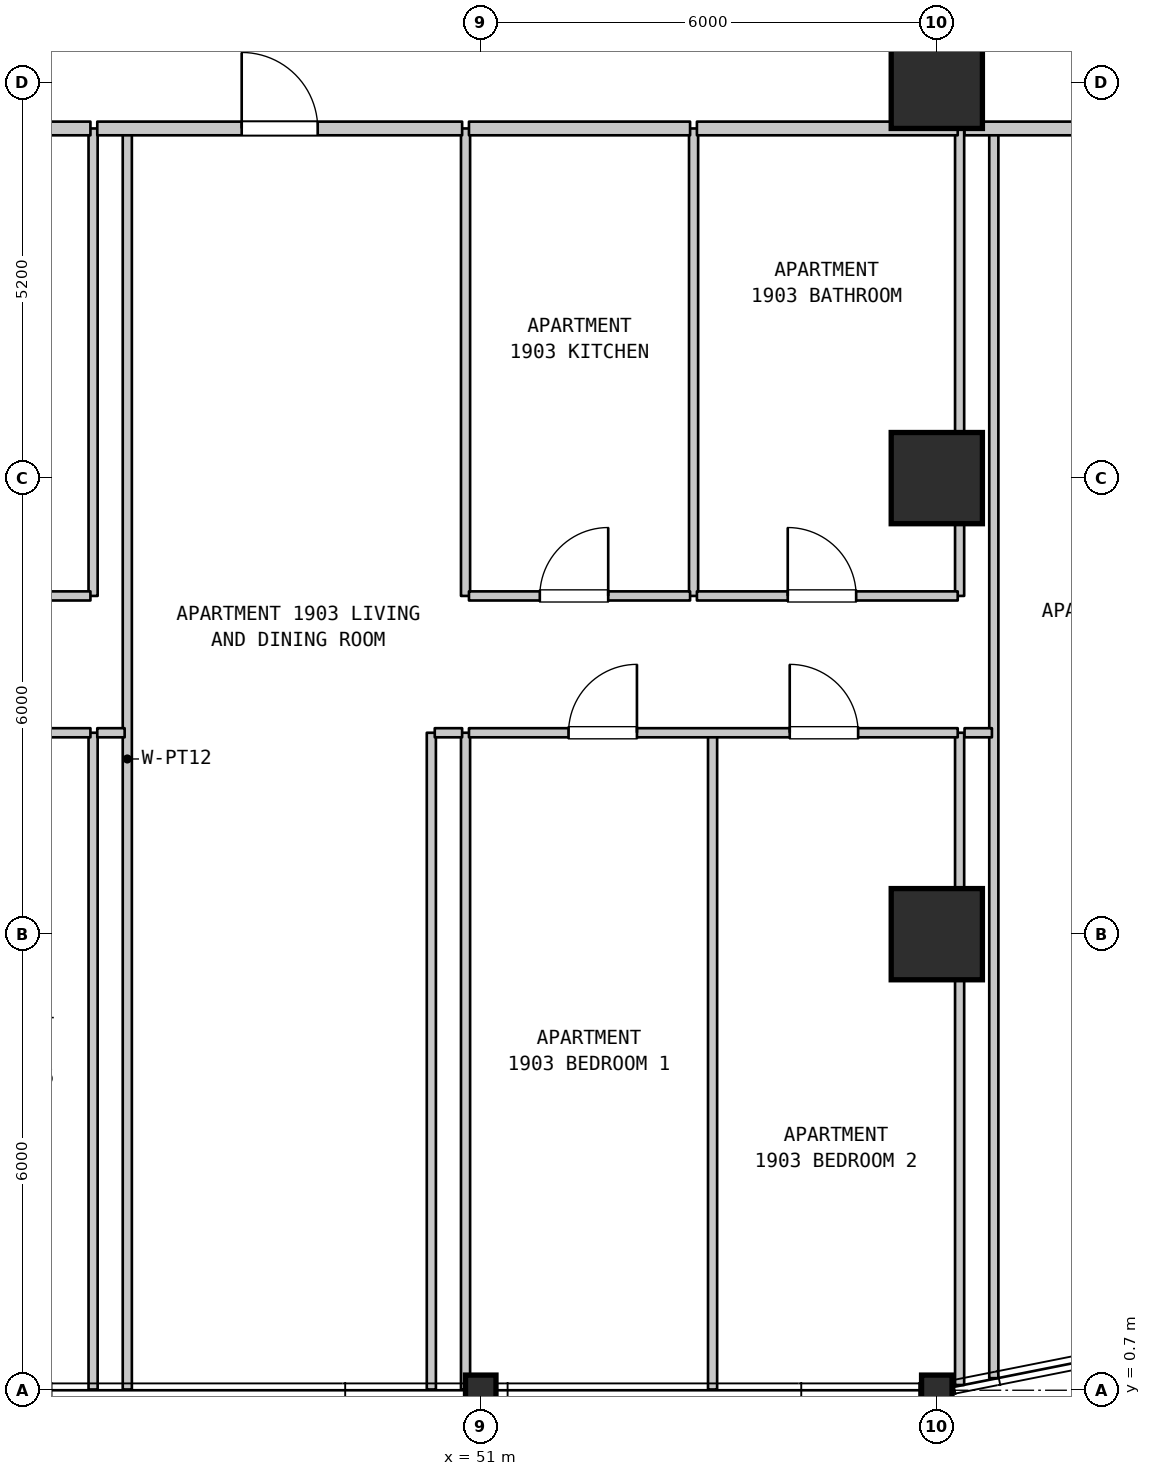
"""IFC4 building model, lengths in metres.
Left out: names, types, materials, properties, quantities, classifications, styles, units other than length and angle.
Written with IfcOpenShell. Run it as: python <this file> out.ifc"""

import sys

from ifc_helpers import new_model, si_unit, direction, frame, frame_2d, origin, origin_2d, place, context, subcontext, project, spatial, rectangle, i_section, extrude, element, fill, save


model = new_model("IFC4")
c1 = context("Model", 3, precision=1e-05, world=origin(), true_north=direction((0.0, 1.0)))
c2 = subcontext(c1, "Body", "Model", "MODEL_VIEW")
j1 = project(units=[si_unit("LENGTHUNIT", "METRE"), si_unit("PLANEANGLEUNIT", "RADIAN")], contexts=[c1])
p1 = place(None, origin())
s1 = spatial("IfcSite", under=j1, at=p1, CompositionType="ELEMENT")
p2 = place(p1, origin())
s2 = spatial("IfcBuilding", under=s1, at=p2, CompositionType="ELEMENT")
p3 = place(p2, frame((0.0, 0.0, 81.2)))
s3 = spatial("IfcBuildingStorey", under=s2, at=p3, CompositionType="ELEMENT", Elevation=81.2)
for number, where, z_axis, x_axis in (
    (1, (51.0, 0.7, 0.0), (0.0, 0.0, 1.0), (1.0, 0.0, 0.0)),
    (2, (57.0, 0.7, 0.0), (0.0, 0.0, 1.0), (1.0, 0.0, 0.0)),
):
    element("IfcColumn", number, at=place(p3, frame(where, z_axis=z_axis, x_axis=x_axis)), inside=s3, PredefinedType="COLUMN", context=c2, shape_type="SweptSolid", body=[
        extrude(i_section(OverallWidth=0.401, OverallDepth=0.399, WebThickness=0.025, FlangeThickness=0.04, FilletRadius=0.015, at=origin_2d()), origin(), (0.0, 0.0, 1.0), 5.2),
    ])
for number, where, z_axis, x_axis in (
    (3, (57.0, 6.7, 0.0), (0.0, 0.0, 1.0), (1.0, 0.0, 0.0)),
    (4, (57.0, 12.7, 0.0), (0.0, 0.0, 1.0), (1.0, 0.0, 0.0)),
    (5, (57.0, 17.9, 0.0), (0.0, 0.0, 1.0), (1.0, 0.0, 0.0)),
):
    element("IfcColumn", number, at=place(p3, frame(where, z_axis=z_axis, x_axis=x_axis)), inside=s3, PredefinedType="COLUMN", context=c2, shape_type="SweptSolid", body=[
        extrude(rectangle(XDim=1.2, YDim=1.2, at=origin_2d()), origin(), (0.0, 0.0, 1.0), 5.2),
    ])
p4 = place(p3, frame((45.9, 0.71, 0.0), z_axis=(0.0, 0.0, 1.0), x_axis=(0.0, 1.0, 0.0)))
e6 = element("IfcWall", 6, at=p4, inside=s3, PredefinedType="PARTITIONING", context=c2, shape_type="SweptSolid", body=[
    extrude(rectangle(XDim=8.64, YDim=0.12, at=frame_2d((4.32, 0.0))), origin(), (0.0, 0.0, 1.0), 4.885),
])
p5 = place(p3, frame((45.9, 11.15, 0.0), z_axis=(0.0, 0.0, 1.0), x_axis=(0.0, 1.0, 0.0)))
e7 = element("IfcWall", 7, at=p5, inside=s3, PredefinedType="PARTITIONING", context=c2, shape_type="SweptSolid", body=[
    extrude(rectangle(XDim=6.15, YDim=0.12, at=frame_2d((3.075, 0.0))), origin(), (0.0, 0.0, 1.0), 4.885),
])
p6 = place(p3, frame((46.35, 0.71, 0.0), z_axis=(0.0, 0.0, 1.0), x_axis=(0.0, 1.0, 0.0)))
e8 = element("IfcWall", 8, at=p6, inside=s3, PredefinedType="PARTITIONING", context=c2, shape_type="SweptSolid", body=[
    extrude(rectangle(XDim=16.59, YDim=0.12, at=frame_2d((8.295, 0.0))), origin(), (0.0, 0.0, 1.0), 4.885),
])
for number, where, z_axis, x_axis in (
    (9, (50.35, 0.71, 0.0), (0.0, 0.0, 1.0), (0.0, 1.0, 0.0)),
    (10, (50.8, 0.71, 0.0), (0.0, 0.0, 1.0), (0.0, 1.0, 0.0)),
):
    element("IfcWall", number, at=place(p3, frame(where, z_axis=z_axis, x_axis=x_axis)), inside=s3, PredefinedType="PARTITIONING", context=c2, shape_type="SweptSolid", body=[
        extrude(rectangle(XDim=8.64, YDim=0.12, at=frame_2d((4.32, 0.0))), origin(), (0.0, 0.0, 1.0), 4.885),
    ])
for number, where, z_axis, x_axis in (
    (11, (50.8, 11.15, 0.0), (0.0, 0.0, 1.0), (0.0, 1.0, 0.0)),
    (12, (53.8, 11.15, 0.0), (0.0, 0.0, 1.0), (0.0, 1.0, 0.0)),
):
    element("IfcWall", number, at=place(p3, frame(where, z_axis=z_axis, x_axis=x_axis)), inside=s3, PredefinedType="PARTITIONING", context=c2, shape_type="SweptSolid", body=[
        extrude(rectangle(XDim=6.15, YDim=0.12, at=frame_2d((3.075, 0.0))), origin(), (0.0, 0.0, 1.0), 4.885),
    ])
p7 = place(p3, frame((54.05, 0.71, 0.0), z_axis=(0.0, 0.0, 1.0), x_axis=(0.0, 1.0, 0.0)))
e13 = element("IfcWall", 13, at=p7, inside=s3, PredefinedType="PARTITIONING", context=c2, shape_type="SweptSolid", body=[
    extrude(rectangle(XDim=8.64, YDim=0.12, at=frame_2d((4.32, 0.0))), origin(), (0.0, 0.0, 1.0), 4.885),
])
p8 = place(p3, frame((57.3, 0.769, 0.0), z_axis=(0.0, 0.0, 1.0), x_axis=(0.0, 1.0, 0.0)))
e14 = element("IfcWall", 14, at=p8, inside=s3, PredefinedType="PARTITIONING", context=c2, shape_type="SweptSolid", body=[
    extrude(rectangle(XDim=8.581, YDim=0.12, at=frame_2d((4.291, 0.0))), origin(), (0.0, 0.0, 1.0), 4.885),
])
p9 = place(p3, frame((57.3, 11.15, 0.0), z_axis=(0.0, 0.0, 1.0), x_axis=(0.0, 1.0, 0.0)))
e15 = element("IfcWall", 15, at=p9, inside=s3, PredefinedType="PARTITIONING", context=c2, shape_type="SweptSolid", body=[
    extrude(rectangle(XDim=6.15, YDim=0.12, at=frame_2d((3.075, 0.0))), origin(), (0.0, 0.0, 1.0), 4.885),
])
p10 = place(p3, frame((57.75, 0.859, 0.0), z_axis=(0.0, 0.0, 1.0), x_axis=(0.0, 1.0, 0.0)))
e16 = element("IfcWall", 16, at=p10, inside=s3, PredefinedType="PARTITIONING", context=c2, shape_type="SweptSolid", body=[
    extrude(rectangle(XDim=16.441, YDim=0.12, at=frame_2d((8.221, 0.0))), origin(), (0.0, 0.0, 1.0), 4.885),
])
p11 = place(p3, frame((33.795, 9.35, 0.0), z_axis=(0.0, 0.0, 1.0), x_axis=(1.0, 0.0, 0.0)))
e17 = element("IfcWall", 17, at=p11, inside=s3, PredefinedType="PARTITIONING", context=c2, shape_type="SweptSolid", body=[
    extrude(rectangle(XDim=12.07, YDim=0.12, at=frame_2d((6.035, 0.0))), origin(), (0.0, 0.0, 1.0), 4.885),
])
p12 = place(p11, frame((0.826, 0.0, 0.0)))
e18 = element("IfcOpeningElement", 18, at=p12, cuts=e17, PredefinedType="OPENING", context=c2, shape_type="SweptSolid", body=[
    extrude(rectangle(XDim=0.9, YDim=2.15, at=frame_2d((0.45, 1.075))), frame((0.0, 0.07, 0.0), z_axis=(0.0, -1.0, 0.0), x_axis=(1.0, 0.0, 0.0)), (0.0, 0.0, 1.0), 0.14),
])
p13 = place(p11, frame((3.08, 0.0, 0.0)))
e19 = element("IfcOpeningElement", 19, at=p13, cuts=e17, PredefinedType="OPENING", context=c2, shape_type="SweptSolid", body=[
    extrude(rectangle(XDim=0.9, YDim=2.15, at=frame_2d((0.45, 1.075))), frame((0.0, 0.07, 0.0), z_axis=(0.0, -1.0, 0.0), x_axis=(1.0, 0.0, 0.0)), (0.0, 0.0, 1.0), 0.14),
])
p14 = place(p11, frame((5.512, 0.0, 0.0)))
e20 = element("IfcOpeningElement", 20, at=p14, cuts=e17, PredefinedType="OPENING", context=c2, shape_type="SweptSolid", body=[
    extrude(rectangle(XDim=0.9, YDim=2.15, at=frame_2d((0.45, 1.075))), frame((0.0, 0.07, 0.0), z_axis=(0.0, -1.0, 0.0), x_axis=(1.0, 0.0, 0.0)), (0.0, 0.0, 1.0), 0.14),
])
p15 = place(p11, frame((7.944, 0.0, 0.0)))
e21 = element("IfcOpeningElement", 21, at=p15, cuts=e17, PredefinedType="OPENING", context=c2, shape_type="SweptSolid", body=[
    extrude(rectangle(XDim=0.9, YDim=2.15, at=frame_2d((0.45, 1.075))), frame((0.0, 0.07, 0.0), z_axis=(0.0, -1.0, 0.0), x_axis=(1.0, 0.0, 0.0)), (0.0, 0.0, 1.0), 0.14),
])
p16 = place(p11, frame((10.204, 0.0, 0.0)))
e22 = element("IfcOpeningElement", 22, at=p16, cuts=e17, PredefinedType="OPENING", context=c2, shape_type="SweptSolid", body=[
    extrude(rectangle(XDim=0.9, YDim=2.15, at=frame_2d((0.45, 1.075))), frame((0.0, 0.07, 0.0), z_axis=(0.0, -1.0, 0.0), x_axis=(1.0, 0.0, 0.0)), (0.0, 0.0, 1.0), 0.14),
])
for number, where, z_axis, x_axis in (
    (23, (45.955, 9.35, 0.0), (0.0, 0.0, 1.0), (1.0, 0.0, 0.0)),
    (24, (50.395, 9.35, 0.0), (0.0, 0.0, 1.0), (1.0, 0.0, 0.0)),
):
    element("IfcWall", number, at=place(p3, frame(where, z_axis=z_axis, x_axis=x_axis)), inside=s3, PredefinedType="PARTITIONING", context=c2, shape_type="SweptSolid", body=[
        extrude(rectangle(XDim=0.36, YDim=0.12, at=frame_2d((0.18, 0.0))), origin(), (0.0, 0.0, 1.0), 4.885),
    ])
p17 = place(p3, frame((50.845, 9.35, 0.0), z_axis=(0.0, 0.0, 1.0), x_axis=(1.0, 0.0, 0.0)))
e25 = element("IfcWall", 25, at=p17, inside=s3, PredefinedType="PARTITIONING", context=c2, shape_type="SweptSolid", body=[
    extrude(rectangle(XDim=6.43, YDim=0.12, at=frame_2d((3.215, 0.0))), origin(), (0.0, 0.0, 1.0), 4.885),
])
p18 = place(p17, frame((1.31, 0.0, 0.0)))
e26 = element("IfcOpeningElement", 26, at=p18, cuts=e25, PredefinedType="OPENING", context=c2, shape_type="SweptSolid", body=[
    extrude(rectangle(XDim=0.9, YDim=2.15, at=frame_2d((0.45, 1.075))), frame((0.0, 0.07, 0.0), z_axis=(0.0, -1.0, 0.0), x_axis=(1.0, 0.0, 0.0)), (0.0, 0.0, 1.0), 0.14),
])
p19 = place(p17, frame((4.22, 0.0, 0.0)))
e27 = element("IfcOpeningElement", 27, at=p19, cuts=e25, PredefinedType="OPENING", context=c2, shape_type="SweptSolid", body=[
    extrude(rectangle(XDim=0.9, YDim=2.15, at=frame_2d((0.45, 1.075))), frame((0.0, 0.07, 0.0), z_axis=(0.0, -1.0, 0.0), x_axis=(1.0, 0.0, 0.0)), (0.0, 0.0, 1.0), 0.14),
])
p20 = place(p3, frame((57.365, 9.35, 0.0), z_axis=(0.0, 0.0, 1.0), x_axis=(1.0, 0.0, 0.0)))
e28 = element("IfcWall", 28, at=p20, inside=s3, PredefinedType="PARTITIONING", context=c2, shape_type="SweptSolid", body=[
    extrude(rectangle(XDim=0.36, YDim=0.12, at=frame_2d((0.18, 0.0))), origin(), (0.0, 0.0, 1.0), 4.885),
])
p21 = place(p3, frame((40.726, 11.15, 0.0), z_axis=(0.0, 0.0, 1.0), x_axis=(1.0, 0.0, 0.0)))
e29 = element("IfcWall", 29, at=p21, inside=s3, PredefinedType="PARTITIONING", context=c2, shape_type="SweptSolid", body=[
    extrude(rectangle(XDim=5.139, YDim=0.12, at=frame_2d((2.569, 0.0))), origin(), (0.0, 0.0, 1.0), 4.885),
])
p22 = place(p21, frame((2.049, 0.0, 0.0)))
e30 = element("IfcOpeningElement", 30, at=p22, cuts=e29, PredefinedType="OPENING", context=c2, shape_type="SweptSolid", body=[
    extrude(rectangle(XDim=0.9, YDim=2.15, at=frame_2d((0.45, 1.075))), frame((0.0, 0.07, 0.0), z_axis=(0.0, -1.0, 0.0), x_axis=(1.0, 0.0, 0.0)), (0.0, 0.0, 1.0), 0.14),
])
p23 = place(p3, frame((50.845, 11.15, 0.0), z_axis=(0.0, 0.0, 1.0), x_axis=(1.0, 0.0, 0.0)))
e31 = element("IfcWall", 31, at=p23, inside=s3, PredefinedType="PARTITIONING", context=c2, shape_type="SweptSolid", body=[
    extrude(rectangle(XDim=2.909, YDim=0.12, at=frame_2d((1.455, 0.0))), origin(), (0.0, 0.0, 1.0), 4.885),
])
p24 = place(p23, frame((0.932, 0.0, 0.0)))
e32 = element("IfcOpeningElement", 32, at=p24, cuts=e31, PredefinedType="OPENING", context=c2, shape_type="SweptSolid", body=[
    extrude(rectangle(XDim=0.9, YDim=2.15, at=frame_2d((0.45, 1.075))), frame((0.0, 0.07, 0.0), z_axis=(0.0, -1.0, 0.0), x_axis=(1.0, 0.0, 0.0)), (0.0, 0.0, 1.0), 0.14),
])
p25 = place(p3, frame((53.844, 11.15, 0.0), z_axis=(0.0, 0.0, 1.0), x_axis=(1.0, 0.0, 0.0)))
e33 = element("IfcWall", 33, at=p25, inside=s3, PredefinedType="PARTITIONING", context=c2, shape_type="SweptSolid", body=[
    extrude(rectangle(XDim=3.431, YDim=0.12, at=frame_2d((1.715, 0.0))), origin(), (0.0, 0.0, 1.0), 4.885),
])
p26 = place(p25, frame((1.195, 0.0, 0.0)))
e34 = element("IfcOpeningElement", 34, at=p26, cuts=e33, PredefinedType="OPENING", context=c2, shape_type="SweptSolid", body=[
    extrude(rectangle(XDim=0.9, YDim=2.1, at=frame_2d((0.45, 1.05))), frame((0.0, 0.07, 0.0), z_axis=(0.0, -1.0, 0.0), x_axis=(1.0, 0.0, 0.0)), (0.0, 0.0, 1.0), 0.14),
])
p27 = place(p3, frame((40.726, 17.3, 0.0), z_axis=(0.0, 0.0, 1.0), x_axis=(1.0, 0.0, 0.0)))
e35 = element("IfcWall", 35, at=p27, inside=s3, PredefinedType="STANDARD", context=c2, shape_type="SweptSolid", body=[
    extrude(rectangle(XDim=5.139, YDim=0.18, at=frame_2d((2.569, 0.0))), origin(), (0.0, 0.0, 1.0), 4.885),
])
p28 = place(p3, frame((45.955, 17.3, 0.0), z_axis=(0.0, 0.0, 1.0), x_axis=(1.0, 0.0, 0.0)))
e36 = element("IfcWall", 36, at=p28, inside=s3, PredefinedType="STANDARD", context=c2, shape_type="SweptSolid", body=[
    extrude(rectangle(XDim=4.8, YDim=0.18, at=frame_2d((2.4, 0.0))), origin(), (0.0, 0.0, 1.0), 4.885),
])
p29 = place(p28, frame((1.9, 0.0, 0.0)))
e37 = element("IfcOpeningElement", 37, at=p29, cuts=e36, PredefinedType="OPENING", context=c2, shape_type="SweptSolid", body=[
    extrude(rectangle(XDim=1.0, YDim=2.15, at=frame_2d((0.5, 1.075))), frame((0.0, 0.1, 0.0), z_axis=(0.0, -1.0, 0.0), x_axis=(1.0, 0.0, 0.0)), (0.0, 0.0, 1.0), 0.2),
])
p30 = place(p3, frame((50.845, 17.3, 0.0), z_axis=(0.0, 0.0, 1.0), x_axis=(1.0, 0.0, 0.0)))
e38 = element("IfcWall", 38, at=p30, inside=s3, PredefinedType="STANDARD", context=c2, shape_type="SweptSolid", body=[
    extrude(rectangle(XDim=2.909, YDim=0.18, at=frame_2d((1.455, 0.0))), origin(), (0.0, 0.0, 1.0), 4.885),
])
p31 = place(p3, frame((53.844, 17.3, 0.0), z_axis=(0.0, 0.0, 1.0), x_axis=(1.0, 0.0, 0.0)))
e39 = element("IfcWall", 39, at=p31, inside=s3, PredefinedType="STANDARD", context=c2, shape_type="SweptSolid", body=[
    extrude(rectangle(XDim=3.431, YDim=0.18, at=frame_2d((1.715, 0.0))), origin(), (0.0, 0.0, 1.0), 4.885),
])
p32 = place(p3, frame((57.365, 17.3, 0.0), z_axis=(0.0, 0.0, 1.0), x_axis=(1.0, 0.0, 0.0)))
e40 = element("IfcWall", 40, at=p32, inside=s3, PredefinedType="STANDARD", context=c2, shape_type="SweptSolid", body=[
    extrude(rectangle(XDim=4.77, YDim=0.18, at=frame_2d((2.385, 0.0))), origin(), (0.0, 0.0, 1.0), 4.885),
])
p33 = place(p32, frame((2.015, 0.0, 0.0)))
e41 = element("IfcOpeningElement", 41, at=p33, cuts=e40, PredefinedType="OPENING", context=c2, shape_type="SweptSolid", body=[
    extrude(rectangle(XDim=1.0, YDim=2.15, at=frame_2d((0.5, 1.075))), frame((0.0, 0.1, 0.0), z_axis=(0.0, -1.0, 0.0), x_axis=(1.0, 0.0, 0.0)), (0.0, 0.0, 1.0), 0.2),
])
p34 = place(p18, origin())
e42 = element("IfcDoor", 42, at=p34, inside=s3, OperationType="SINGLE_SWING_RIGHT", PredefinedType="DOOR", context=c2, shape_type="SweptSolid", body=[
    extrude(rectangle(XDim=0.9, YDim=2.15, at=frame_2d((0.45, 1.075))), frame((0.0, 0.025, 0.0), z_axis=(0.0, -1.0, 0.0), x_axis=(1.0, 0.0, 0.0)), (0.0, 0.0, 1.0), 0.05),
])
fill(e26, e42)
p35 = place(p19, origin())
e43 = element("IfcDoor", 43, at=p35, inside=s3, OperationType="SINGLE_SWING_LEFT", PredefinedType="DOOR", context=c2, shape_type="SweptSolid", body=[
    extrude(rectangle(XDim=0.9, YDim=2.15, at=frame_2d((0.45, 1.075))), frame((0.0, 0.025, 0.0), z_axis=(0.0, -1.0, 0.0), x_axis=(1.0, 0.0, 0.0)), (0.0, 0.0, 1.0), 0.05),
])
fill(e27, e43)
p36 = place(p24, origin())
e44 = element("IfcDoor", 44, at=p36, inside=s3, OperationType="SINGLE_SWING_RIGHT", PredefinedType="DOOR", context=c2, shape_type="SweptSolid", body=[
    extrude(rectangle(XDim=0.9, YDim=2.15, at=frame_2d((0.45, 1.075))), frame((0.0, 0.025, 0.0), z_axis=(0.0, -1.0, 0.0), x_axis=(1.0, 0.0, 0.0)), (0.0, 0.0, 1.0), 0.05),
])
fill(e32, e44)
p37 = place(p26, origin())
e45 = element("IfcDoor", 45, at=p37, inside=s3, OperationType="SINGLE_SWING_LEFT", PredefinedType="DOOR", context=c2, shape_type="SweptSolid", body=[
    extrude(rectangle(XDim=0.9, YDim=2.1, at=frame_2d((0.45, 1.05))), frame((0.0, 0.025, 0.0), z_axis=(0.0, -1.0, 0.0), x_axis=(1.0, 0.0, 0.0)), (0.0, 0.0, 1.0), 0.05),
])
fill(e34, e45)
p38 = place(p29, origin())
e46 = element("IfcDoor", 46, at=p38, inside=s3, OperationType="SINGLE_SWING_LEFT", PredefinedType="DOOR", context=c2, shape_type="SweptSolid", body=[
    extrude(rectangle(XDim=1.0, YDim=2.15, at=frame_2d((0.5, 1.075))), frame((0.0, 0.025, 0.0), z_axis=(0.0, -1.0, 0.0), x_axis=(1.0, 0.0, 0.0)), (0.0, 0.0, 1.0), 0.05),
])
fill(e37, e46)
save(model, sys.argv[1])
